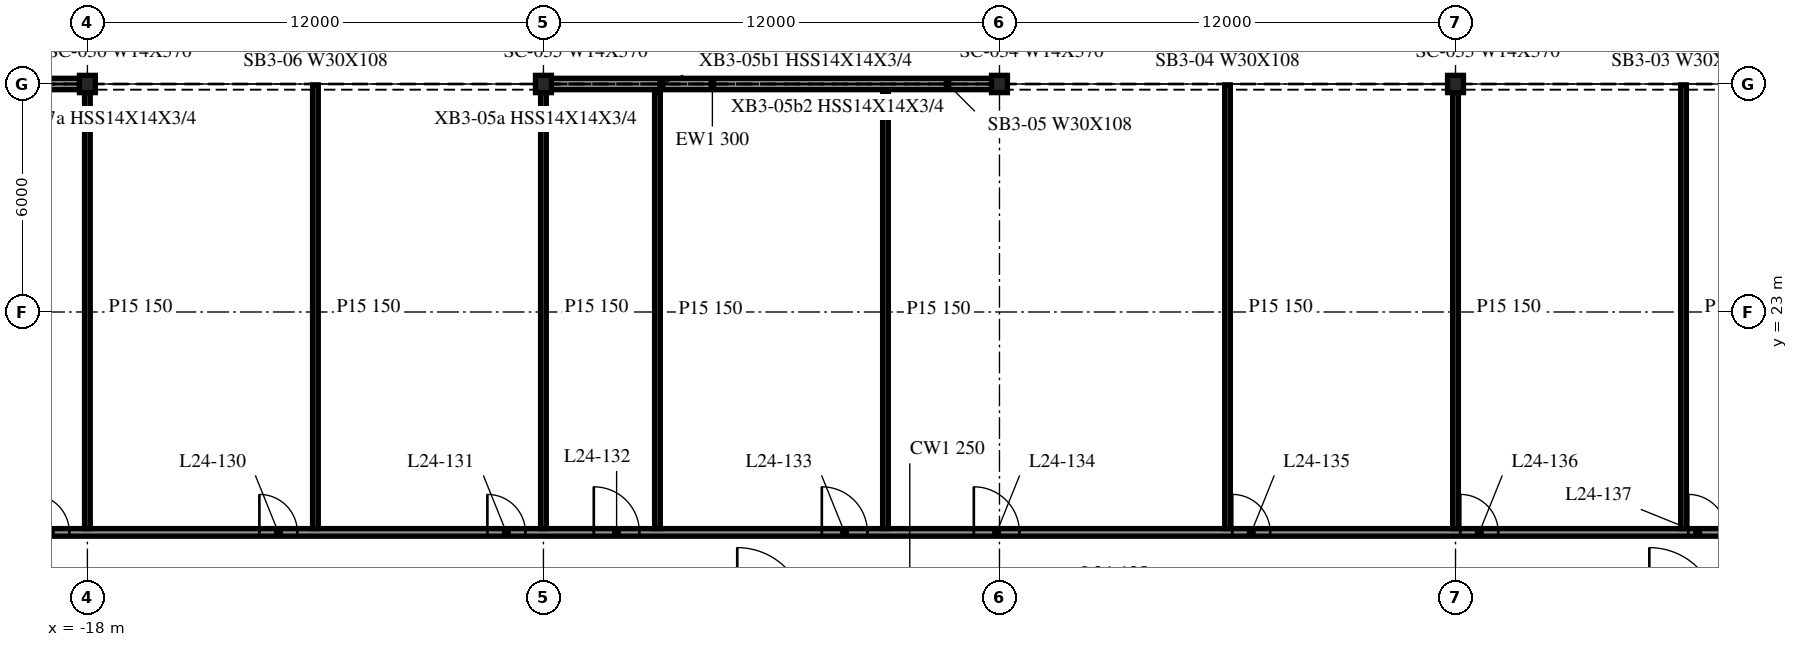
"""IFC4 building model, lengths in metres.
Left out: names, types, materials, properties, quantities, classifications, styles, units other than length and angle.
Written with IfcOpenShell. Run it as: python <this file> out.ifc"""

import sys

from ifc_helpers import new_model, si_unit, direction, frame, frame_2d, origin, origin_2d, place, context, subcontext, project, spatial, rectangle, i_section, extrude, element, fill, save


model = new_model("IFC4")
c1 = context("Model", 3, precision=1e-05, world=origin(), true_north=direction((0.0, 1.0)))
c2 = subcontext(c1, "Body", "Model", "MODEL_VIEW")
j1 = project(units=[si_unit("LENGTHUNIT", "METRE"), si_unit("PLANEANGLEUNIT", "RADIAN")], contexts=[c1])
p1 = place(None, origin())
s1 = spatial("IfcSite", under=j1, at=p1, CompositionType="ELEMENT")
p2 = place(p1, origin())
s2 = spatial("IfcBuilding", under=s1, at=p2, CompositionType="ELEMENT")
p3 = place(p2, frame((0.0, 0.0, 105.3)))
s3 = spatial("IfcBuildingStorey", under=s2, at=p3, CompositionType="ELEMENT", Elevation=105.3)
for number, where, z_axis, x_axis in (
    (1, (18.0, 29.0, -0.34), (0.0, 0.0, 1.0), (1.0, 0.0, 0.0)),
    (2, (6.0, 29.0, -0.34), (0.0, 0.0, 1.0), (1.0, 0.0, 0.0)),
    (3, (-6.0, 29.0, -0.34), (0.0, 0.0, 1.0), (1.0, 0.0, 0.0)),
    (4, (-18.0, 29.0, -0.34), (0.0, 0.0, 1.0), (1.0, 0.0, 0.0)),
):
    element("IfcColumn", number, at=place(p3, frame(where, z_axis=z_axis, x_axis=x_axis)), inside=s3, PredefinedType="COLUMN", context=c2, shape_type="SweptSolid", body=[
        extrude(i_section(OverallWidth=0.419, OverallDepth=0.455, WebThickness=0.042, FlangeThickness=0.068, at=origin_2d()), origin(), (0.0, 0.0, 1.0), 4.1),
    ])
for number, where, z_axis, x_axis in (
    (5, (5.979, 29.0, 0.0), (0.0, 0.0, 1.0), (-1.0, 0.0, 0.0)),
    (6, (-18.021, 29.0, 0.0), (0.0, 0.0, 1.0), (-1.0, 0.0, 0.0)),
):
    element("IfcWall", number, at=place(p3, frame(where, z_axis=z_axis, x_axis=x_axis)), inside=s3, PredefinedType="NOTDEFINED", context=c2, shape_type="SweptSolid", body=[
        extrude(rectangle(XDim=11.958, YDim=0.3, at=frame_2d((5.979, 0.0))), origin(), (0.0, 0.0, 1.0), 3.003),
    ])
p4 = place(p3, frame((-41.975, 17.2, 0.0), z_axis=(0.0, 0.0, 1.0), x_axis=(1.0, 0.0, 0.0)))
e7 = element("IfcWall", 7, at=p4, inside=s3, PredefinedType="PARTITIONING", context=c2, shape_type="SweptSolid", body=[
    extrude(rectangle(XDim=95.95, YDim=0.2, at=frame_2d((47.975, 0.0))), origin(), (0.0, 0.0, 1.0), 3.76),
])
p5 = place(p4, frame((4.3, 0.0, 0.0)))
e8 = element("IfcOpeningElement", 8, at=p5, cuts=e7, PredefinedType="OPENING", context=c2, shape_type="SweptSolid", body=[
    extrude(rectangle(XDim=1.2, YDim=2.1, at=frame_2d((0.6, 1.05))), frame((0.0, 0.11, 0.0), z_axis=(0.0, -1.0, 0.0), x_axis=(1.0, 0.0, 0.0)), (0.0, 0.0, 1.0), 0.22),
])
p6 = place(p4, frame((7.3, 0.0, 0.0)))
e9 = element("IfcOpeningElement", 9, at=p6, cuts=e7, PredefinedType="OPENING", context=c2, shape_type="SweptSolid", body=[
    extrude(rectangle(XDim=1.2, YDim=2.1, at=frame_2d((0.6, 1.05))), frame((0.0, 0.11, 0.0), z_axis=(0.0, -1.0, 0.0), x_axis=(1.0, 0.0, 0.0)), (0.0, 0.0, 1.0), 0.22),
])
p7 = place(p4, frame((13.3, 0.0, 0.0)))
e10 = element("IfcOpeningElement", 10, at=p7, cuts=e7, PredefinedType="OPENING", context=c2, shape_type="SweptSolid", body=[
    extrude(rectangle(XDim=1.2, YDim=2.1, at=frame_2d((0.6, 1.05))), frame((0.0, 0.11, 0.0), z_axis=(0.0, -1.0, 0.0), x_axis=(1.0, 0.0, 0.0)), (0.0, 0.0, 1.0), 0.22),
])
p8 = place(p4, frame((22.5, 0.0, 0.0)))
e11 = element("IfcOpeningElement", 11, at=p8, cuts=e7, PredefinedType="OPENING", context=c2, shape_type="SweptSolid", body=[
    extrude(rectangle(XDim=1.0, YDim=2.1, at=frame_2d((0.5, 1.05))), frame((0.0, 0.11, 0.0), z_axis=(0.0, -1.0, 0.0), x_axis=(1.0, 0.0, 0.0)), (0.0, 0.0, 1.0), 0.22),
])
p9 = place(p4, frame((28.5, 0.0, 0.0)))
e12 = element("IfcOpeningElement", 12, at=p9, cuts=e7, PredefinedType="OPENING", context=c2, shape_type="SweptSolid", body=[
    extrude(rectangle(XDim=1.0, YDim=2.1, at=frame_2d((0.5, 1.05))), frame((0.0, 0.11, 0.0), z_axis=(0.0, -1.0, 0.0), x_axis=(1.0, 0.0, 0.0)), (0.0, 0.0, 1.0), 0.22),
])
p10 = place(p4, frame((34.5, 0.0, 0.0)))
e13 = element("IfcOpeningElement", 13, at=p10, cuts=e7, PredefinedType="OPENING", context=c2, shape_type="SweptSolid", body=[
    extrude(rectangle(XDim=1.0, YDim=2.1, at=frame_2d((0.5, 1.05))), frame((0.0, 0.11, 0.0), z_axis=(0.0, -1.0, 0.0), x_axis=(1.0, 0.0, 0.0)), (0.0, 0.0, 1.0), 0.22),
])
p11 = place(p4, frame((37.3, 0.0, 0.0)))
e14 = element("IfcOpeningElement", 14, at=p11, cuts=e7, PredefinedType="OPENING", context=c2, shape_type="SweptSolid", body=[
    extrude(rectangle(XDim=1.2, YDim=2.1, at=frame_2d((0.6, 1.05))), frame((0.0, 0.11, 0.0), z_axis=(0.0, -1.0, 0.0), x_axis=(1.0, 0.0, 0.0)), (0.0, 0.0, 1.0), 0.22),
])
p12 = place(p4, frame((43.3, 0.0, 0.0)))
e15 = element("IfcOpeningElement", 15, at=p12, cuts=e7, PredefinedType="OPENING", context=c2, shape_type="SweptSolid", body=[
    extrude(rectangle(XDim=1.2, YDim=2.1, at=frame_2d((0.6, 1.05))), frame((0.0, 0.11, 0.0), z_axis=(0.0, -1.0, 0.0), x_axis=(1.0, 0.0, 0.0)), (0.0, 0.0, 1.0), 0.22),
])
p13 = place(p4, frame((47.3, 0.0, 0.0)))
e16 = element("IfcOpeningElement", 16, at=p13, cuts=e7, PredefinedType="OPENING", context=c2, shape_type="SweptSolid", body=[
    extrude(rectangle(XDim=1.2, YDim=2.1, at=frame_2d((0.6, 1.05))), frame((0.0, 0.11, 0.0), z_axis=(0.0, -1.0, 0.0), x_axis=(1.0, 0.0, 0.0)), (0.0, 0.0, 1.0), 0.22),
])
p14 = place(p4, frame((54.1, 0.0, 0.0)))
e17 = element("IfcOpeningElement", 17, at=p14, cuts=e7, PredefinedType="OPENING", context=c2, shape_type="SweptSolid", body=[
    extrude(rectangle(XDim=1.0, YDim=2.1, at=frame_2d((0.5, 1.05))), frame((0.0, 0.11, 0.0), z_axis=(0.0, -1.0, 0.0), x_axis=(1.0, 0.0, 0.0)), (0.0, 0.0, 1.0), 0.22),
])
p15 = place(p4, frame((60.1, 0.0, 0.0)))
e18 = element("IfcOpeningElement", 18, at=p15, cuts=e7, PredefinedType="OPENING", context=c2, shape_type="SweptSolid", body=[
    extrude(rectangle(XDim=1.0, YDim=2.1, at=frame_2d((0.5, 1.05))), frame((0.0, 0.11, 0.0), z_axis=(0.0, -1.0, 0.0), x_axis=(1.0, 0.0, 0.0)), (0.0, 0.0, 1.0), 0.22),
])
p16 = place(p4, frame((66.1, 0.0, 0.0)))
e19 = element("IfcOpeningElement", 19, at=p16, cuts=e7, PredefinedType="OPENING", context=c2, shape_type="SweptSolid", body=[
    extrude(rectangle(XDim=1.0, YDim=2.1, at=frame_2d((0.5, 1.05))), frame((0.0, 0.11, 0.0), z_axis=(0.0, -1.0, 0.0), x_axis=(1.0, 0.0, 0.0)), (0.0, 0.0, 1.0), 0.22),
])
p17 = place(p4, frame((69.1, 0.0, 0.0)))
e20 = element("IfcOpeningElement", 20, at=p17, cuts=e7, PredefinedType="OPENING", context=c2, shape_type="SweptSolid", body=[
    extrude(rectangle(XDim=1.2, YDim=2.1, at=frame_2d((0.6, 1.05))), frame((0.0, 0.11, 0.0), z_axis=(0.0, -1.0, 0.0), x_axis=(1.0, 0.0, 0.0)), (0.0, 0.0, 1.0), 0.22),
])
p18 = place(p4, frame((75.1, 0.0, 0.0)))
e21 = element("IfcOpeningElement", 21, at=p18, cuts=e7, PredefinedType="OPENING", context=c2, shape_type="SweptSolid", body=[
    extrude(rectangle(XDim=1.2, YDim=2.1, at=frame_2d((0.6, 1.05))), frame((0.0, 0.11, 0.0), z_axis=(0.0, -1.0, 0.0), x_axis=(1.0, 0.0, 0.0)), (0.0, 0.0, 1.0), 0.22),
])
p19 = place(p4, frame((84.1, 0.0, 0.0)))
e22 = element("IfcOpeningElement", 22, at=p19, cuts=e7, PredefinedType="OPENING", context=c2, shape_type="SweptSolid", body=[
    extrude(rectangle(XDim=1.2, YDim=2.1, at=frame_2d((0.6, 1.05))), frame((0.0, 0.11, 0.0), z_axis=(0.0, -1.0, 0.0), x_axis=(1.0, 0.0, 0.0)), (0.0, 0.0, 1.0), 0.22),
])
p20 = place(p4, frame((90.1, 0.0, 0.0)))
e23 = element("IfcOpeningElement", 23, at=p20, cuts=e7, PredefinedType="OPENING", context=c2, shape_type="SweptSolid", body=[
    extrude(rectangle(XDim=1.0, YDim=2.1, at=frame_2d((0.5, 1.05))), frame((0.0, 0.11, 0.0), z_axis=(0.0, -1.0, 0.0), x_axis=(1.0, 0.0, 0.0)), (0.0, 0.0, 1.0), 0.22),
])
for number, where, z_axis, x_axis in (
    (24, (-18.0, 17.3, 0.0), (0.0, 0.0, 1.0), (0.0, 1.0, 0.0)),
    (25, (-12.0, 17.3, 0.0), (0.0, 0.0, 1.0), (0.0, 1.0, 0.0)),
    (26, (-6.0, 17.3, 0.0), (0.0, 0.0, 1.0), (0.0, 1.0, 0.0)),
):
    element("IfcWall", number, at=place(p3, frame(where, z_axis=z_axis, x_axis=x_axis)), inside=s3, PredefinedType="PARTITIONING", context=c2, shape_type="SweptSolid", body=[
        extrude(rectangle(XDim=11.675, YDim=0.15, at=frame_2d((5.837, 0.0))), origin(), (0.0, 0.0, 1.0), 3.76),
    ])
for number, where, z_axis, x_axis in (
    (27, (-3.0, 17.3, 0.0), (0.0, 0.0, 1.0), (0.0, 1.0, 0.0)),
    (28, (3.0, 17.3, 0.0), (0.0, 0.0, 1.0), (0.0, 1.0, 0.0)),
):
    element("IfcWall", number, at=place(p3, frame(where, z_axis=z_axis, x_axis=x_axis)), inside=s3, PredefinedType="PARTITIONING", context=c2, shape_type="SweptSolid", body=[
        extrude(rectangle(XDim=11.55, YDim=0.15, at=frame_2d((5.775, 0.0))), origin(), (0.0, 0.0, 1.0), 3.76),
    ])
for number, where, z_axis, x_axis in (
    (29, (12.0, 17.3, 0.0), (0.0, 0.0, 1.0), (0.0, 1.0, 0.0)),
    (30, (18.0, 17.3, 0.0), (0.0, 0.0, 1.0), (0.0, 1.0, 0.0)),
    (31, (24.0, 17.3, 0.0), (0.0, 0.0, 1.0), (0.0, 1.0, 0.0)),
):
    element("IfcWall", number, at=place(p3, frame(where, z_axis=z_axis, x_axis=x_axis)), inside=s3, PredefinedType="PARTITIONING", context=c2, shape_type="SweptSolid", body=[
        extrude(rectangle(XDim=11.675, YDim=0.15, at=frame_2d((5.837, 0.0))), origin(), (0.0, 0.0, 1.0), 3.76),
    ])
p21 = place(p8, origin())
e32 = element("IfcDoor", 32, at=p21, inside=s3, OperationType="SINGLE_SWING_LEFT", PredefinedType="DOOR", context=c2, shape_type="SweptSolid", body=[
    extrude(rectangle(XDim=1.0, YDim=2.1, at=frame_2d((0.5, 1.05))), frame((0.0, 0.025, 0.0), z_axis=(0.0, -1.0, 0.0), x_axis=(1.0, 0.0, 0.0)), (0.0, 0.0, 1.0), 0.05),
])
fill(e11, e32)
p22 = place(p9, origin())
e33 = element("IfcDoor", 33, at=p22, inside=s3, OperationType="SINGLE_SWING_LEFT", PredefinedType="DOOR", context=c2, shape_type="SweptSolid", body=[
    extrude(rectangle(XDim=1.0, YDim=2.1, at=frame_2d((0.5, 1.05))), frame((0.0, 0.025, 0.0), z_axis=(0.0, -1.0, 0.0), x_axis=(1.0, 0.0, 0.0)), (0.0, 0.0, 1.0), 0.05),
])
fill(e12, e33)
p23 = place(p10, origin())
e34 = element("IfcDoor", 34, at=p23, inside=s3, OperationType="SINGLE_SWING_LEFT", PredefinedType="DOOR", context=c2, shape_type="SweptSolid", body=[
    extrude(rectangle(XDim=1.0, YDim=2.1, at=frame_2d((0.5, 1.05))), frame((0.0, 0.025, 0.0), z_axis=(0.0, -1.0, 0.0), x_axis=(1.0, 0.0, 0.0)), (0.0, 0.0, 1.0), 0.05),
])
fill(e13, e34)
p24 = place(p11, origin())
e35 = element("IfcDoor", 35, at=p24, inside=s3, OperationType="SINGLE_SWING_LEFT", PredefinedType="DOOR", context=c2, shape_type="SweptSolid", body=[
    extrude(rectangle(XDim=1.2, YDim=2.1, at=frame_2d((0.6, 1.05))), frame((0.0, 0.025, 0.0), z_axis=(0.0, -1.0, 0.0), x_axis=(1.0, 0.0, 0.0)), (0.0, 0.0, 1.0), 0.05),
])
fill(e14, e35)
p25 = place(p12, origin())
e36 = element("IfcDoor", 36, at=p25, inside=s3, OperationType="SINGLE_SWING_LEFT", PredefinedType="DOOR", context=c2, shape_type="SweptSolid", body=[
    extrude(rectangle(XDim=1.2, YDim=2.1, at=frame_2d((0.6, 1.05))), frame((0.0, 0.025, 0.0), z_axis=(0.0, -1.0, 0.0), x_axis=(1.0, 0.0, 0.0)), (0.0, 0.0, 1.0), 0.05),
])
fill(e15, e36)
p26 = place(p13, origin())
e37 = element("IfcDoor", 37, at=p26, inside=s3, OperationType="SINGLE_SWING_RIGHT", PredefinedType="DOOR", context=c2, shape_type="SweptSolid", body=[
    extrude(rectangle(XDim=1.2, YDim=2.1, at=frame_2d((0.6, 1.05))), frame((0.0, 0.025, 0.0), z_axis=(0.0, -1.0, 0.0), x_axis=(1.0, 0.0, 0.0)), (0.0, 0.0, 1.0), 0.05),
])
fill(e16, e37)
p27 = place(p14, origin())
e38 = element("IfcDoor", 38, at=p27, inside=s3, OperationType="SINGLE_SWING_RIGHT", PredefinedType="DOOR", context=c2, shape_type="SweptSolid", body=[
    extrude(rectangle(XDim=1.0, YDim=2.1, at=frame_2d((0.5, 1.05))), frame((0.0, 0.025, 0.0), z_axis=(0.0, -1.0, 0.0), x_axis=(1.0, 0.0, 0.0)), (0.0, 0.0, 1.0), 0.05),
])
fill(e17, e38)
p28 = place(p15, origin())
e39 = element("IfcDoor", 39, at=p28, inside=s3, OperationType="SINGLE_SWING_RIGHT", PredefinedType="DOOR", context=c2, shape_type="SweptSolid", body=[
    extrude(rectangle(XDim=1.0, YDim=2.1, at=frame_2d((0.5, 1.05))), frame((0.0, 0.025, 0.0), z_axis=(0.0, -1.0, 0.0), x_axis=(1.0, 0.0, 0.0)), (0.0, 0.0, 1.0), 0.05),
])
fill(e18, e39)
p29 = place(p16, origin())
e40 = element("IfcDoor", 40, at=p29, inside=s3, OperationType="SINGLE_SWING_RIGHT", PredefinedType="DOOR", context=c2, shape_type="SweptSolid", body=[
    extrude(rectangle(XDim=1.0, YDim=2.1, at=frame_2d((0.5, 1.05))), frame((0.0, 0.025, 0.0), z_axis=(0.0, -1.0, 0.0), x_axis=(1.0, 0.0, 0.0)), (0.0, 0.0, 1.0), 0.05),
])
fill(e19, e40)
save(model, sys.argv[1])
